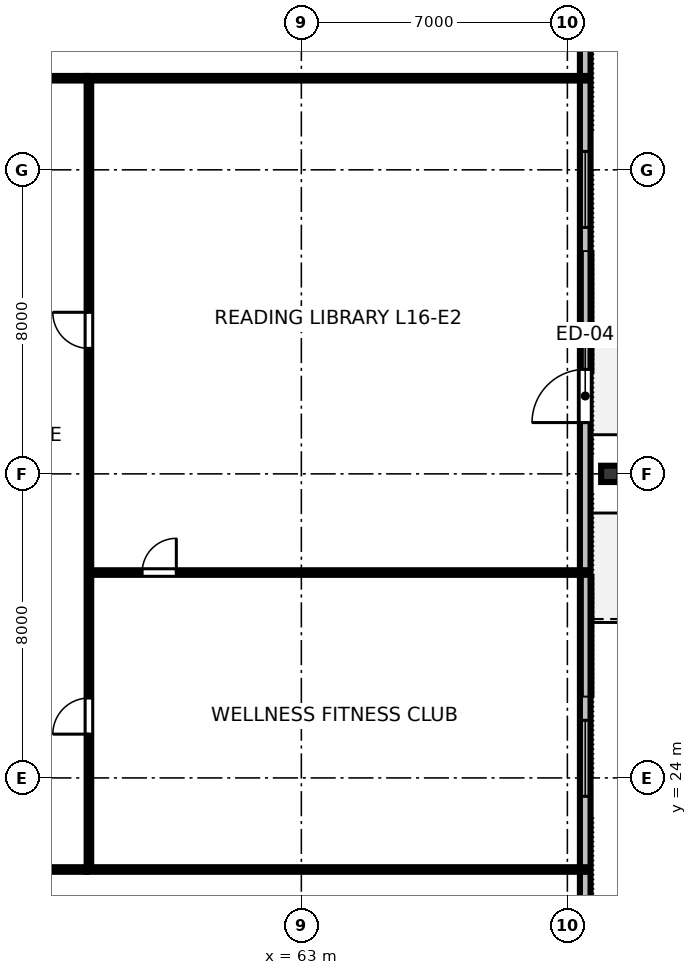
"""IFC4 building model, lengths in metres.
Left out: names, types, materials, properties, quantities, classifications, styles, units other than length and angle.
Written with IfcOpenShell. Run it as: python <this file> out.ifc"""

import sys

from ifc_helpers import new_model, si_unit, direction, frame, frame_2d, origin, origin_2d, place, context, subcontext, project, spatial, rectangle, i_section, extrude, element, fill, save


model = new_model("IFC4")
c1 = context("Model", 3, precision=1e-05, world=origin(), true_north=direction((0.0, 1.0)))
c2 = subcontext(c1, "Body", "Model", "MODEL_VIEW")
j1 = project(units=[si_unit("LENGTHUNIT", "METRE"), si_unit("PLANEANGLEUNIT", "RADIAN")], contexts=[c1])
p1 = place(None, origin())
s1 = spatial("IfcSite", under=j1, at=p1, CompositionType="ELEMENT")
p2 = place(p1, origin())
s2 = spatial("IfcBuilding", under=s1, at=p2, CompositionType="ELEMENT")
p3 = place(p2, frame((0.0, 0.0, 64.0)))
s3 = spatial("IfcBuildingStorey", under=s2, at=p3, CompositionType="ELEMENT", Elevation=64.0)
p4 = place(p3, frame((71.13, 32.0, 0.0), z_axis=(0.0, 0.0, 1.0), x_axis=(0.0, 1.0, 0.0)))
e1 = element("IfcColumn", 1, at=p4, inside=s3, PredefinedType="COLUMN", context=c2, shape_type="SweptSolid", body=[
    extrude(i_section(OverallWidth=0.428, OverallDepth=0.483, WebThickness=0.051, FlangeThickness=0.082, FilletRadius=0.025, at=origin_2d()), origin(), (0.0, 0.0, 1.0), 3.358),
])
p5 = place(p3, frame((70.47, 14.06, 0.0), z_axis=(0.0, 0.0, 1.0), x_axis=(0.0, 1.0, 0.0)))
e2 = element("IfcWall", 2, at=p5, inside=s3, PredefinedType="STANDARD", context=c2, shape_type="SweptSolid", body=[
    extrude(rectangle(XDim=35.88, YDim=0.28, at=frame_2d((17.94, 0.0))), origin(), (0.0, 0.0, 1.0), 3.36),
])
p6 = place(p5, frame((19.29, 0.0, 0.0)))
e3 = element("IfcOpeningElement", 3, at=p6, cuts=e2, PredefinedType="OPENING", context=c2, shape_type="SweptSolid", body=[
    extrude(rectangle(XDim=1.4, YDim=2.15, at=frame_2d((0.7, 1.075))), frame((0.0, 0.15, 0.0), z_axis=(0.0, -1.0, 0.0), x_axis=(1.0, 0.0, 0.0)), (0.0, 0.0, 1.0), 0.3),
])
p7 = place(p5, frame((1.971, 0.0, 0.8)))
e4 = element("IfcOpeningElement", 4, at=p7, cuts=e2, PredefinedType="OPENING", context=c2, shape_type="SweptSolid", body=[
    extrude(rectangle(XDim=2.0, YDim=1.95, at=frame_2d((1.0, 0.975))), frame((0.0, 0.15, 0.0), z_axis=(0.0, -1.0, 0.0), x_axis=(1.0, 0.0, 0.0)), (0.0, 0.0, 1.0), 0.3),
])
p8 = place(p5, frame((9.456, 0.0, 0.8)))
e5 = element("IfcOpeningElement", 5, at=p8, cuts=e2, PredefinedType="OPENING", context=c2, shape_type="SweptSolid", body=[
    extrude(rectangle(XDim=2.0, YDim=1.95, at=frame_2d((1.0, 0.975))), frame((0.0, 0.15, 0.0), z_axis=(0.0, -1.0, 0.0), x_axis=(1.0, 0.0, 0.0)), (0.0, 0.0, 1.0), 0.3),
])
p9 = place(p5, frame((24.424, 0.0, 0.8)))
e6 = element("IfcOpeningElement", 6, at=p9, cuts=e2, PredefinedType="OPENING", context=c2, shape_type="SweptSolid", body=[
    extrude(rectangle(XDim=2.0, YDim=1.95, at=frame_2d((1.0, 0.975))), frame((0.0, 0.15, 0.0), z_axis=(0.0, -1.0, 0.0), x_axis=(1.0, 0.0, 0.0)), (0.0, 0.0, 1.0), 0.3),
])
p10 = place(p5, frame((31.909, 0.0, 0.8)))
e7 = element("IfcOpeningElement", 7, at=p10, cuts=e2, PredefinedType="OPENING", context=c2, shape_type="SweptSolid", body=[
    extrude(rectangle(XDim=2.0, YDim=1.95, at=frame_2d((1.0, 0.975))), frame((0.0, 0.15, 0.0), z_axis=(0.0, -1.0, 0.0), x_axis=(1.0, 0.0, 0.0)), (0.0, 0.0, 1.0), 0.3),
])
p11 = place(p3, frame((34.65, 21.59, 0.0), z_axis=(0.0, 0.0, 1.0), x_axis=(1.0, 0.0, 0.0)))
e8 = element("IfcWall", 8, at=p11, inside=s3, PredefinedType="PARTITIONING", context=c2, shape_type="SweptSolid", body=[
    extrude(rectangle(XDim=22.7, YDim=0.12, at=frame_2d((11.35, 0.0))), origin(), (0.0, 0.0, 1.0), 2.64),
])
p12 = place(p11, frame((3.365, 0.0, 0.0)))
e9 = element("IfcOpeningElement", 9, at=p12, cuts=e8, PredefinedType="OPENING", context=c2, shape_type="SweptSolid", body=[
    extrude(rectangle(XDim=0.95, YDim=2.15, at=frame_2d((0.475, 1.075))), frame((0.0, 0.07, 0.0), z_axis=(0.0, -1.0, 0.0), x_axis=(1.0, 0.0, 0.0)), (0.0, 0.0, 1.0), 0.14),
])
p13 = place(p11, frame((8.718, 0.0, 0.0)))
e10 = element("IfcOpeningElement", 10, at=p13, cuts=e8, PredefinedType="OPENING", context=c2, shape_type="SweptSolid", body=[
    extrude(rectangle(XDim=0.95, YDim=2.15, at=frame_2d((0.475, 1.075))), frame((0.0, 0.07, 0.0), z_axis=(0.0, -1.0, 0.0), x_axis=(1.0, 0.0, 0.0)), (0.0, 0.0, 1.0), 0.14),
])
p14 = place(p11, frame((13.651, 0.0, 0.0)))
e11 = element("IfcOpeningElement", 11, at=p14, cuts=e8, PredefinedType="OPENING", context=c2, shape_type="SweptSolid", body=[
    extrude(rectangle(XDim=0.95, YDim=2.15, at=frame_2d((0.475, 1.075))), frame((0.0, 0.07, 0.0), z_axis=(0.0, -1.0, 0.0), x_axis=(1.0, 0.0, 0.0)), (0.0, 0.0, 1.0), 0.14),
])
p15 = place(p11, frame((19.509, 0.0, 0.0)))
e12 = element("IfcOpeningElement", 12, at=p15, cuts=e8, PredefinedType="OPENING", context=c2, shape_type="SweptSolid", body=[
    extrude(rectangle(XDim=0.95, YDim=2.15, at=frame_2d((0.475, 1.075))), frame((0.0, 0.07, 0.0), z_axis=(0.0, -1.0, 0.0), x_axis=(1.0, 0.0, 0.0)), (0.0, 0.0, 1.0), 0.14),
])
p16 = place(p3, frame((34.65, 42.41, 0.0), z_axis=(0.0, 0.0, 1.0), x_axis=(1.0, 0.0, 0.0)))
e13 = element("IfcWall", 13, at=p16, inside=s3, PredefinedType="PARTITIONING", context=c2, shape_type="SweptSolid", body=[
    extrude(rectangle(XDim=22.7, YDim=0.12, at=frame_2d((11.35, 0.0))), origin(), (0.0, 0.0, 1.0), 2.64),
])
p17 = place(p16, frame((2.59, 0.0, 0.0)))
e14 = element("IfcOpeningElement", 14, at=p17, cuts=e13, PredefinedType="OPENING", context=c2, shape_type="SweptSolid", body=[
    extrude(rectangle(XDim=0.95, YDim=2.15, at=frame_2d((0.475, 1.075))), frame((0.0, 0.07, 0.0), z_axis=(0.0, -1.0, 0.0), x_axis=(1.0, 0.0, 0.0)), (0.0, 0.0, 1.0), 0.14),
])
p18 = place(p16, frame((8.768, 0.0, 0.0)))
e15 = element("IfcOpeningElement", 15, at=p18, cuts=e13, PredefinedType="OPENING", context=c2, shape_type="SweptSolid", body=[
    extrude(rectangle(XDim=0.95, YDim=2.15, at=frame_2d((0.475, 1.075))), frame((0.0, 0.07, 0.0), z_axis=(0.0, -1.0, 0.0), x_axis=(1.0, 0.0, 0.0)), (0.0, 0.0, 1.0), 0.14),
])
p19 = place(p16, frame((14.079, 0.0, 0.0)))
e16 = element("IfcOpeningElement", 16, at=p19, cuts=e13, PredefinedType="OPENING", context=c2, shape_type="SweptSolid", body=[
    extrude(rectangle(XDim=0.95, YDim=2.15, at=frame_2d((0.475, 1.075))), frame((0.0, 0.07, 0.0), z_axis=(0.0, -1.0, 0.0), x_axis=(1.0, 0.0, 0.0)), (0.0, 0.0, 1.0), 0.14),
])
p20 = place(p16, frame((19.11, 0.0, 0.0)))
e17 = element("IfcOpeningElement", 17, at=p20, cuts=e13, PredefinedType="OPENING", context=c2, shape_type="SweptSolid", body=[
    extrude(rectangle(XDim=0.95, YDim=2.15, at=frame_2d((0.475, 1.075))), frame((0.0, 0.07, 0.0), z_axis=(0.0, -1.0, 0.0), x_axis=(1.0, 0.0, 0.0)), (0.0, 0.0, 1.0), 0.14),
])
p21 = place(p3, frame((57.41, 29.404, 0.0), z_axis=(0.0, 0.0, 1.0), x_axis=(1.0, 0.0, 0.0)))
e18 = element("IfcWall", 18, at=p21, inside=s3, PredefinedType="PARTITIONING", context=c2, shape_type="SweptSolid", body=[
    extrude(rectangle(XDim=13.06, YDim=0.12, at=frame_2d((6.53, 0.0))), origin(), (0.0, 0.0, 1.0), 2.64),
])
p22 = place(p21, frame((1.4, 0.0, 0.0)))
e19 = element("IfcOpeningElement", 19, at=p22, cuts=e18, PredefinedType="OPENING", context=c2, shape_type="SweptSolid", body=[
    extrude(rectangle(XDim=0.9, YDim=2.15, at=frame_2d((0.45, 1.075))), frame((0.0, 0.07, 0.0), z_axis=(0.0, -1.0, 0.0), x_axis=(1.0, 0.0, 0.0)), (0.0, 0.0, 1.0), 0.14),
])
p23 = place(p3, frame((57.41, 21.65, 0.0), z_axis=(0.0, 0.0, 1.0), x_axis=(0.0, 1.0, 0.0)))
e20 = element("IfcWall", 20, at=p23, inside=s3, PredefinedType="PARTITIONING", context=c2, shape_type="SweptSolid", body=[
    extrude(rectangle(XDim=20.7, YDim=0.12, at=frame_2d((10.35, 0.0))), origin(), (0.0, 0.0, 1.0), 2.64),
])
p24 = place(p23, frame((3.502, 0.0, 0.0)))
e21 = element("IfcOpeningElement", 21, at=p24, cuts=e20, PredefinedType="OPENING", context=c2, shape_type="SweptSolid", body=[
    extrude(rectangle(XDim=0.95, YDim=2.15, at=frame_2d((0.475, 1.075))), frame((0.0, 0.07, 0.0), z_axis=(0.0, -1.0, 0.0), x_axis=(1.0, 0.0, 0.0)), (0.0, 0.0, 1.0), 0.14),
])
p25 = place(p23, frame((13.652, 0.0, 0.0)))
e22 = element("IfcOpeningElement", 22, at=p25, cuts=e20, PredefinedType="OPENING", context=c2, shape_type="SweptSolid", body=[
    extrude(rectangle(XDim=0.95, YDim=2.15, at=frame_2d((0.475, 1.075))), frame((0.0, 0.07, 0.0), z_axis=(0.0, -1.0, 0.0), x_axis=(1.0, 0.0, 0.0)), (0.0, 0.0, 1.0), 0.14),
])
for number, where, z_axis, x_axis in (
    (23, (57.35, 21.59, 0.0), (0.0, 0.0, 1.0), (1.0, 0.0, 0.0)),
    (24, (57.35, 42.41, 0.0), (0.0, 0.0, 1.0), (1.0, 0.0, 0.0)),
):
    element("IfcWall", number, at=place(p3, frame(where, z_axis=z_axis, x_axis=x_axis)), inside=s3, PredefinedType="PARTITIONING", context=c2, shape_type="SweptSolid", body=[
        extrude(rectangle(XDim=13.12, YDim=0.12, at=frame_2d((6.56, 0.0))), origin(), (0.0, 0.0, 1.0), 2.64),
    ])
p26 = place(p6, origin())
e25 = element("IfcDoor", 25, at=p26, inside=s3, OperationType="SINGLE_SWING_LEFT", PredefinedType="DOOR", context=c2, shape_type="SweptSolid", body=[
    extrude(rectangle(XDim=1.4, YDim=2.15, at=frame_2d((0.7, 1.075))), frame((0.0, 0.025, 0.0), z_axis=(0.0, -1.0, 0.0), x_axis=(1.0, 0.0, 0.0)), (0.0, 0.0, 1.0), 0.05),
])
fill(e3, e25)
p27 = place(p8, origin())
e26 = element("IfcWindow", 26, at=p27, inside=s3, PartitioningType="SINGLE_PANEL", PredefinedType="WINDOW", context=c2, shape_type="SweptSolid", body=[
    extrude(rectangle(XDim=2.0, YDim=1.95, at=frame_2d((1.0, 0.975))), frame((0.0, 0.03, 0.0), z_axis=(0.0, -1.0, 0.0), x_axis=(1.0, 0.0, 0.0)), (0.0, 0.0, 1.0), 0.06),
])
fill(e5, e26)
p28 = place(p9, origin())
e27 = element("IfcWindow", 27, at=p28, inside=s3, PartitioningType="SINGLE_PANEL", PredefinedType="WINDOW", context=c2, shape_type="SweptSolid", body=[
    extrude(rectangle(XDim=2.0, YDim=1.95, at=frame_2d((1.0, 0.975))), frame((0.0, 0.03, 0.0), z_axis=(0.0, -1.0, 0.0), x_axis=(1.0, 0.0, 0.0)), (0.0, 0.0, 1.0), 0.06),
])
fill(e6, e27)
p29 = place(p22, origin())
e28 = element("IfcDoor", 28, at=p29, inside=s3, OperationType="SINGLE_SWING_RIGHT", PredefinedType="DOOR", context=c2, shape_type="SweptSolid", body=[
    extrude(rectangle(XDim=0.9, YDim=2.15, at=frame_2d((0.45, 1.075))), frame((0.0, 0.025, 0.0), z_axis=(0.0, -1.0, 0.0), x_axis=(1.0, 0.0, 0.0)), (0.0, 0.0, 1.0), 0.05),
])
fill(e19, e28)
p30 = place(p24, origin())
e29 = element("IfcDoor", 29, at=p30, inside=s3, OperationType="SINGLE_SWING_LEFT", PredefinedType="DOOR", context=c2, shape_type="SweptSolid", body=[
    extrude(rectangle(XDim=0.95, YDim=2.15, at=frame_2d((0.475, 1.075))), frame((0.0, 0.025, 0.0), z_axis=(0.0, -1.0, 0.0), x_axis=(1.0, 0.0, 0.0)), (0.0, 0.0, 1.0), 0.05),
])
fill(e21, e29)
p31 = place(p25, origin())
e30 = element("IfcDoor", 30, at=p31, inside=s3, OperationType="SINGLE_SWING_RIGHT", PredefinedType="DOOR", context=c2, shape_type="SweptSolid", body=[
    extrude(rectangle(XDim=0.95, YDim=2.15, at=frame_2d((0.475, 1.075))), frame((0.0, 0.025, 0.0), z_axis=(0.0, -1.0, 0.0), x_axis=(1.0, 0.0, 0.0)), (0.0, 0.0, 1.0), 0.05),
])
fill(e22, e30)
save(model, sys.argv[1])
